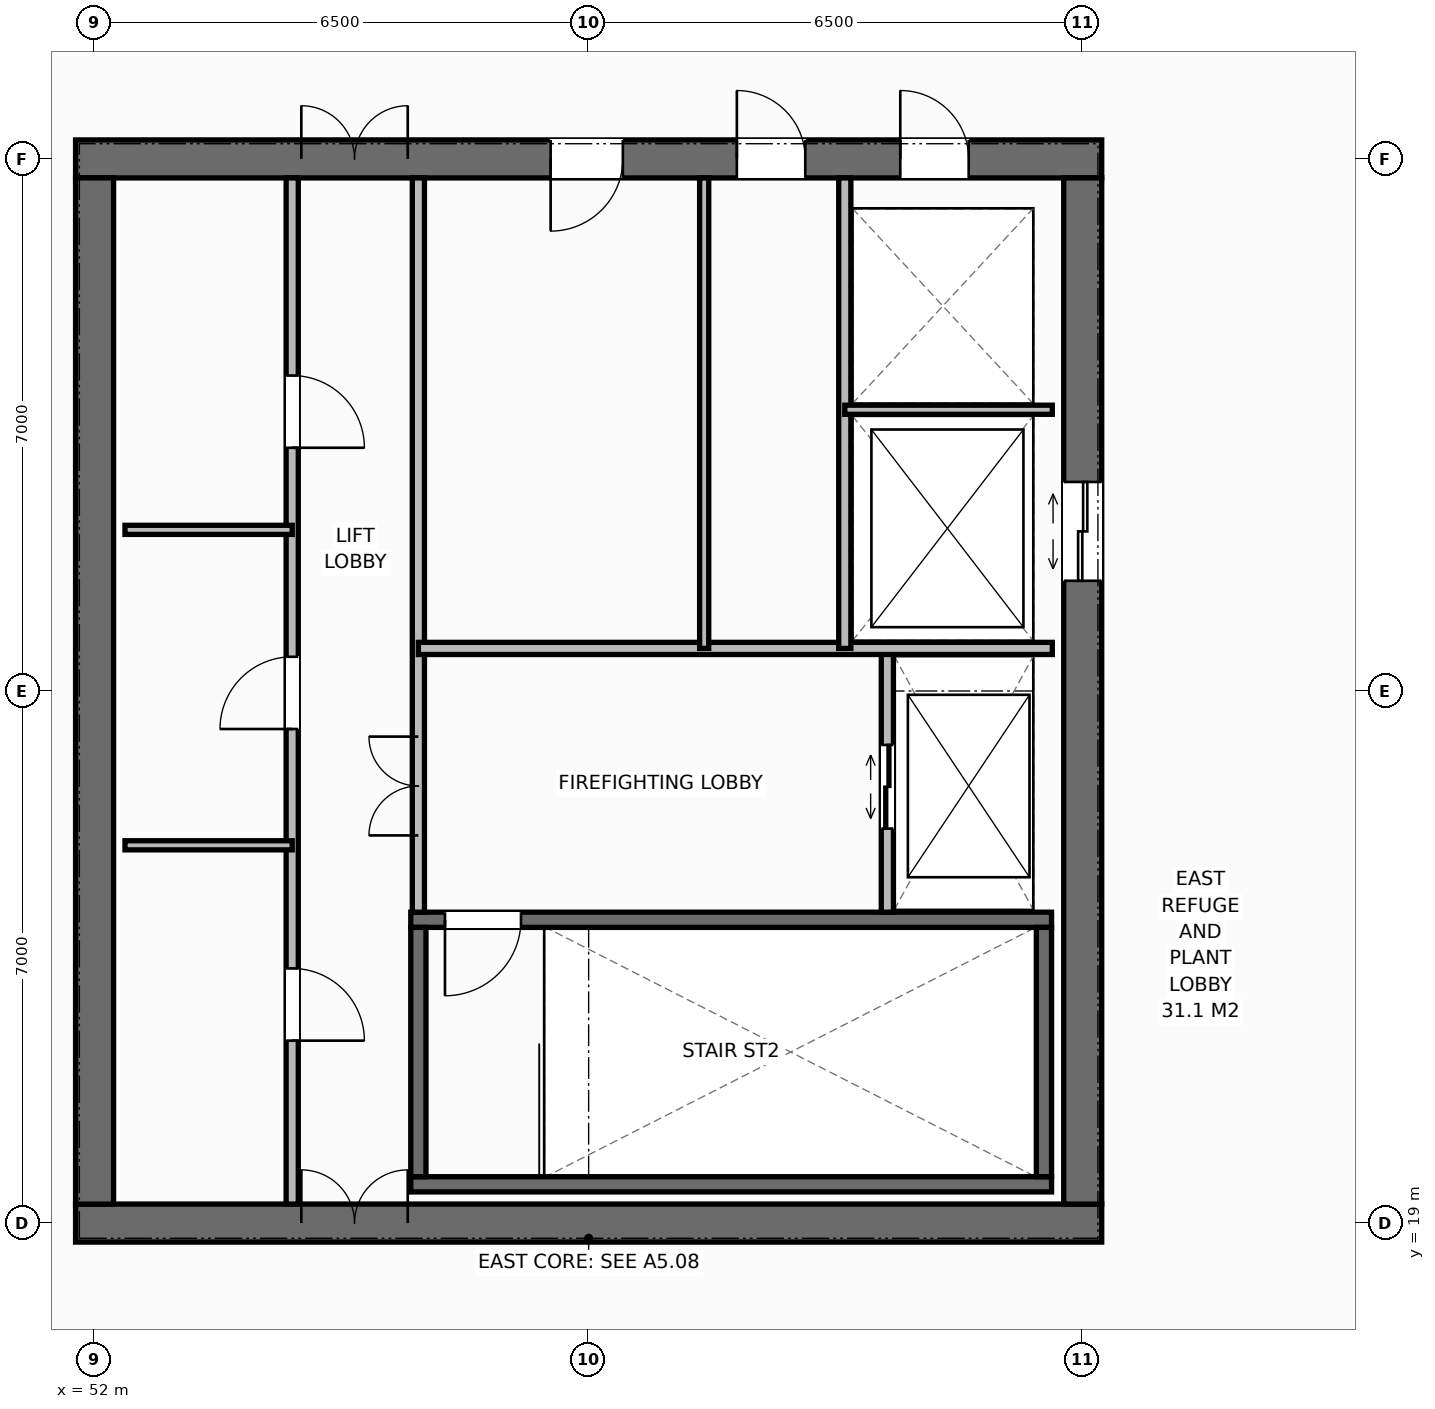
"""IFC4 building model, lengths in metres.
Left out: names, types, materials, properties, quantities, classifications, styles, units other than length and angle.
Written with IfcOpenShell. Run it as: python <this file> out.ifc"""

import sys

from ifc_helpers import new_model, si_unit, direction, frame, frame_2d, origin, place, context, subcontext, project, spatial, rectangle, extrude, element, fill, save


model = new_model("IFC4")
c1 = context("Model", 3, precision=1e-05, world=origin(), true_north=direction((0.0, 1.0)))
c2 = subcontext(c1, "Body", "Model", "MODEL_VIEW")
j1 = project(units=[si_unit("LENGTHUNIT", "METRE"), si_unit("PLANEANGLEUNIT", "RADIAN")], contexts=[c1])
p1 = place(None, origin())
s1 = spatial("IfcSite", under=j1, at=p1, CompositionType="ELEMENT")
p2 = place(p1, origin())
s2 = spatial("IfcBuilding", under=s1, at=p2, CompositionType="ELEMENT")
p3 = place(p2, frame((0.0, 0.0, 315.4)))
s3 = spatial("IfcBuildingStorey", under=s2, at=p3, CompositionType="ELEMENT", Elevation=315.4)
p4 = place(p3, frame((51.75, 19.0, 0.0), z_axis=(0.0, 0.0, 1.0), x_axis=(1.0, 0.0, 0.0)))
e1 = element("IfcWall", 1, at=p4, inside=s3, PredefinedType="SHEAR", context=c2, shape_type="SweptSolid", body=[
    extrude(rectangle(XDim=13.5, YDim=0.5, at=frame_2d((6.75, 0.0))), origin(), (0.0, 0.0, 1.0), 4.58),
])
p5 = place(p4, frame((2.97, 0.0, 0.0)))
e2 = element("IfcOpeningElement", 2, at=p5, cuts=e1, PredefinedType="OPENING", context=c2, shape_type="SweptSolid", body=[
    extrude(rectangle(XDim=1.4, YDim=2.2, at=frame_2d((0.7, 1.1))), frame((0.0, 0.26, 0.0), z_axis=(0.0, -1.0, 0.0), x_axis=(1.0, 0.0, 0.0)), (0.0, 0.0, 1.0), 0.52),
])
p6 = place(p3, frame((51.75, 33.0, 0.0), z_axis=(0.0, 0.0, 1.0), x_axis=(1.0, 0.0, 0.0)))
e3 = element("IfcWall", 3, at=p6, inside=s3, PredefinedType="SHEAR", context=c2, shape_type="SweptSolid", body=[
    extrude(rectangle(XDim=13.5, YDim=0.5, at=frame_2d((6.75, 0.0))), origin(), (0.0, 0.0, 1.0), 4.58),
])
p7 = place(p6, frame((2.97, 0.0, 0.0)))
e4 = element("IfcOpeningElement", 4, at=p7, cuts=e3, PredefinedType="OPENING", context=c2, shape_type="SweptSolid", body=[
    extrude(rectangle(XDim=1.4, YDim=2.2, at=frame_2d((0.7, 1.1))), frame((0.0, 0.26, 0.0), z_axis=(0.0, -1.0, 0.0), x_axis=(1.0, 0.0, 0.0)), (0.0, 0.0, 1.0), 0.52),
])
p8 = place(p6, frame((10.85, 0.0, 0.0)))
e5 = element("IfcOpeningElement", 5, at=p8, cuts=e3, PredefinedType="OPENING", context=c2, shape_type="SweptSolid", body=[
    extrude(rectangle(XDim=0.9, YDim=2.15, at=frame_2d((0.45, 1.075))), frame((0.0, 0.26, 0.0), z_axis=(0.0, -1.0, 0.0), x_axis=(1.0, 0.0, 0.0)), (0.0, 0.0, 1.0), 0.52),
])
p9 = place(p6, frame((6.25, 0.0, 0.0)))
e6 = element("IfcOpeningElement", 6, at=p9, cuts=e3, PredefinedType="OPENING", context=c2, shape_type="SweptSolid", body=[
    extrude(rectangle(XDim=0.95, YDim=2.15, at=frame_2d((0.475, 1.075))), frame((0.0, 0.26, 0.0), z_axis=(0.0, -1.0, 0.0), x_axis=(1.0, 0.0, 0.0)), (0.0, 0.0, 1.0), 0.52),
])
p10 = place(p6, frame((8.7, 0.0, 0.0)))
e7 = element("IfcOpeningElement", 7, at=p10, cuts=e3, PredefinedType="OPENING", context=c2, shape_type="SweptSolid", body=[
    extrude(rectangle(XDim=0.9, YDim=2.15, at=frame_2d((0.45, 1.075))), frame((0.0, 0.26, 0.0), z_axis=(0.0, -1.0, 0.0), x_axis=(1.0, 0.0, 0.0)), (0.0, 0.0, 1.0), 0.52),
])
p11 = place(p3, frame((52.0, 19.25, 0.0), z_axis=(0.0, 0.0, 1.0), x_axis=(0.0, 1.0, 0.0)))
e8 = element("IfcWall", 8, at=p11, inside=s3, PredefinedType="SHEAR", context=c2, shape_type="SweptSolid", body=[
    extrude(rectangle(XDim=13.5, YDim=0.5, at=frame_2d((6.75, 0.0))), origin(), (0.0, 0.0, 1.0), 4.58),
])
p12 = place(p3, frame((65.0, 19.25, 0.0), z_axis=(0.0, 0.0, 1.0), x_axis=(0.0, 1.0, 0.0)))
e9 = element("IfcWall", 9, at=p12, inside=s3, PredefinedType="SHEAR", context=c2, shape_type="SweptSolid", body=[
    extrude(rectangle(XDim=13.5, YDim=0.5, at=frame_2d((6.75, 0.0))), origin(), (0.0, 0.0, 1.0), 4.58),
])
p13 = place(p12, frame((8.2, 0.0, 0.0)))
e10 = element("IfcOpeningElement", 10, at=p13, cuts=e9, PredefinedType="OPENING", context=c2, shape_type="SweptSolid", body=[
    extrude(rectangle(XDim=1.3, YDim=2.2, at=frame_2d((0.65, 1.1))), frame((0.0, 0.26, 0.0), z_axis=(0.0, -1.0, 0.0), x_axis=(1.0, 0.0, 0.0)), (0.0, 0.0, 1.0), 0.52),
])
p14 = place(p3, frame((56.16, 19.51, 0.0), z_axis=(0.0, 0.0, 1.0), x_axis=(1.0, 0.0, 0.0)))
e11 = element("IfcWall", 11, at=p14, inside=s3, PredefinedType="SHEAR", context=c2, shape_type="SweptSolid", body=[
    extrude(rectangle(XDim=8.43, YDim=0.2, at=frame_2d((4.215, 0.0))), origin(), (0.0, 0.0, 1.0), 4.58),
])
p15 = place(p3, frame((56.16, 22.99, 0.0), z_axis=(0.0, 0.0, 1.0), x_axis=(1.0, 0.0, 0.0)))
e12 = element("IfcWall", 12, at=p15, inside=s3, PredefinedType="SHEAR", context=c2, shape_type="SweptSolid", body=[
    extrude(rectangle(XDim=8.43, YDim=0.2, at=frame_2d((4.215, 0.0))), origin(), (0.0, 0.0, 1.0), 4.58),
])
p16 = place(p15, frame((0.45, 0.0, 0.0)))
e13 = element("IfcOpeningElement", 13, at=p16, cuts=e12, PredefinedType="OPENING", context=c2, shape_type="SweptSolid", body=[
    extrude(rectangle(XDim=1.0, YDim=2.15, at=frame_2d((0.5, 1.075))), frame((0.0, 0.11, 0.0), z_axis=(0.0, -1.0, 0.0), x_axis=(1.0, 0.0, 0.0)), (0.0, 0.0, 1.0), 0.22),
])
for number, where, z_axis, x_axis in (
    (14, (56.26, 19.61, 0.0), (0.0, 0.0, 1.0), (0.0, 1.0, 0.0)),
    (15, (64.49, 19.61, 0.0), (0.0, 0.0, 1.0), (0.0, 1.0, 0.0)),
):
    element("IfcWall", number, at=place(p3, frame(where, z_axis=z_axis, x_axis=x_axis)), inside=s3, PredefinedType="SHEAR", context=c2, shape_type="SweptSolid", body=[
        extrude(rectangle(XDim=3.28, YDim=0.2, at=frame_2d((1.64, 0.0))), origin(), (0.0, 0.0, 1.0), 4.58),
    ])
p17 = place(p3, frame((54.6, 19.25, 0.0), z_axis=(0.0, 0.0, 1.0), x_axis=(0.0, 1.0, 0.0)))
e16 = element("IfcWall", 16, at=p17, inside=s3, PredefinedType="STANDARD", context=c2, shape_type="SweptSolid", body=[
    extrude(rectangle(XDim=13.5, YDim=0.16, at=frame_2d((6.75, 0.0))), origin(), (0.0, 0.0, 1.0), 4.58),
])
p18 = place(p17, frame((2.15, 0.0, 0.0)))
e17 = element("IfcOpeningElement", 17, at=p18, cuts=e16, PredefinedType="OPENING", context=c2, shape_type="SweptSolid", body=[
    extrude(rectangle(XDim=0.95, YDim=2.15, at=frame_2d((0.475, 1.075))), frame((0.0, 0.09, 0.0), z_axis=(0.0, -1.0, 0.0), x_axis=(1.0, 0.0, 0.0)), (0.0, 0.0, 1.0), 0.18),
])
p19 = place(p17, frame((6.25, 0.0, 0.0)))
e18 = element("IfcOpeningElement", 18, at=p19, cuts=e16, PredefinedType="OPENING", context=c2, shape_type="SweptSolid", body=[
    extrude(rectangle(XDim=0.95, YDim=2.15, at=frame_2d((0.475, 1.075))), frame((0.0, 0.09, 0.0), z_axis=(0.0, -1.0, 0.0), x_axis=(1.0, 0.0, 0.0)), (0.0, 0.0, 1.0), 0.18),
])
p20 = place(p17, frame((9.95, 0.0, 0.0)))
e19 = element("IfcOpeningElement", 19, at=p20, cuts=e16, PredefinedType="OPENING", context=c2, shape_type="SweptSolid", body=[
    extrude(rectangle(XDim=0.95, YDim=2.15, at=frame_2d((0.475, 1.075))), frame((0.0, 0.09, 0.0), z_axis=(0.0, -1.0, 0.0), x_axis=(1.0, 0.0, 0.0)), (0.0, 0.0, 1.0), 0.18),
])
p21 = place(p3, frame((56.26, 23.09, 0.0), z_axis=(0.0, 0.0, 1.0), x_axis=(0.0, 1.0, 0.0)))
e20 = element("IfcWall", 20, at=p21, inside=s3, PredefinedType="STANDARD", context=c2, shape_type="SweptSolid", body=[
    extrude(rectangle(XDim=9.66, YDim=0.16, at=frame_2d((4.83, 0.0))), origin(), (0.0, 0.0, 1.0), 4.58),
])
p22 = place(p21, frame((1.01, 0.0, 0.0)))
e21 = element("IfcOpeningElement", 21, at=p22, cuts=e20, PredefinedType="OPENING", context=c2, shape_type="SweptSolid", body=[
    extrude(rectangle(XDim=1.3, YDim=2.2, at=frame_2d((0.65, 1.1))), frame((0.0, 0.09, 0.0), z_axis=(0.0, -1.0, 0.0), x_axis=(1.0, 0.0, 0.0)), (0.0, 0.0, 1.0), 0.18),
])
for number, where, z_axis, x_axis in (
    (22, (52.4, 23.97, 0.0), (0.0, 0.0, 1.0), (1.0, 0.0, 0.0)),
    (23, (52.4, 28.12, 0.0), (0.0, 0.0, 1.0), (1.0, 0.0, 0.0)),
):
    element("IfcWall", number, at=place(p3, frame(where, z_axis=z_axis, x_axis=x_axis)), inside=s3, PredefinedType="PARTITIONING", context=c2, shape_type="SweptSolid", body=[
        extrude(rectangle(XDim=2.2, YDim=0.12, at=frame_2d((1.1, 0.0))), origin(), (0.0, 0.0, 1.0), 4.58),
    ])
p23 = place(p3, frame((62.43, 23.09, 0.0), z_axis=(0.0, 0.0, 1.0), x_axis=(0.0, 1.0, 0.0)))
e24 = element("IfcWall", 24, at=p23, inside=s3, PredefinedType="STANDARD", context=c2, shape_type="SweptSolid", body=[
    extrude(rectangle(XDim=3.47, YDim=0.16, at=frame_2d((1.735, 0.0))), origin(), (0.0, 0.0, 1.0), 4.58),
])
p24 = place(p23, frame((1.1, 0.0, 0.0)))
e25 = element("IfcOpeningElement", 25, at=p24, cuts=e24, PredefinedType="OPENING", context=c2, shape_type="SweptSolid", body=[
    extrude(rectangle(XDim=1.1, YDim=2.2, at=frame_2d((0.55, 1.1))), frame((0.0, 0.09, 0.0), z_axis=(0.0, -1.0, 0.0), x_axis=(1.0, 0.0, 0.0)), (0.0, 0.0, 1.0), 0.18),
])
p25 = place(p3, frame((56.26, 26.56, 0.0), z_axis=(0.0, 0.0, 1.0), x_axis=(1.0, 0.0, 0.0)))
e26 = element("IfcWall", 26, at=p25, inside=s3, PredefinedType="STANDARD", context=c2, shape_type="SweptSolid", body=[
    extrude(rectangle(XDim=8.34, YDim=0.16, at=frame_2d((4.17, 0.0))), origin(), (0.0, 0.0, 1.0), 4.58),
])
p26 = place(p3, frame((61.87, 26.56, 0.0), z_axis=(0.0, 0.0, 1.0), x_axis=(0.0, 1.0, 0.0)))
e27 = element("IfcWall", 27, at=p26, inside=s3, PredefinedType="STANDARD", context=c2, shape_type="SweptSolid", body=[
    extrude(rectangle(XDim=6.19, YDim=0.16, at=frame_2d((3.095, 0.0))), origin(), (0.0, 0.0, 1.0), 4.58),
])
p27 = place(p3, frame((61.87, 29.7, 0.0), z_axis=(0.0, 0.0, 1.0), x_axis=(1.0, 0.0, 0.0)))
e28 = element("IfcWall", 28, at=p27, inside=s3, PredefinedType="PARTITIONING", context=c2, shape_type="SweptSolid", body=[
    extrude(rectangle(XDim=2.73, YDim=0.12, at=frame_2d((1.365, 0.0))), origin(), (0.0, 0.0, 1.0), 4.58),
])
p28 = place(p3, frame((60.02, 26.56, 0.0), z_axis=(0.0, 0.0, 1.0), x_axis=(0.0, 1.0, 0.0)))
e29 = element("IfcWall", 29, at=p28, inside=s3, PredefinedType="PARTITIONING", context=c2, shape_type="SweptSolid", body=[
    extrude(rectangle(XDim=6.19, YDim=0.12, at=frame_2d((3.095, 0.0))), origin(), (0.0, 0.0, 1.0), 4.58),
])
p29 = place(p5, origin())
e30 = element("IfcDoor", 30, at=p29, inside=s3, OperationType="DOUBLE_DOOR_SINGLE_SWING", PredefinedType="DOOR", context=c2, shape_type="SweptSolid", body=[
    extrude(rectangle(XDim=1.4, YDim=2.2, at=frame_2d((0.7, 1.1))), frame((0.0, 0.075, 0.0), z_axis=(0.0, -1.0, 0.0), x_axis=(1.0, 0.0, 0.0)), (0.0, 0.0, 1.0), 0.05),
])
fill(e2, e30)
p30 = place(p7, origin())
e31 = element("IfcDoor", 31, at=p30, inside=s3, OperationType="DOUBLE_DOOR_SINGLE_SWING", PredefinedType="DOOR", context=c2, shape_type="SweptSolid", body=[
    extrude(rectangle(XDim=1.4, YDim=2.2, at=frame_2d((0.7, 1.1))), frame((0.0, -0.025, 0.0), z_axis=(0.0, -1.0, 0.0), x_axis=(1.0, 0.0, 0.0)), (0.0, 0.0, 1.0), 0.05),
])
fill(e4, e31)
p31 = place(p18, origin())
e32 = element("IfcDoor", 32, at=p31, inside=s3, OperationType="SINGLE_SWING_RIGHT", PredefinedType="DOOR", context=c2, shape_type="SweptSolid", body=[
    extrude(rectangle(XDim=0.95, YDim=2.15, at=frame_2d((0.475, 1.075))), frame((0.0, 0.025, 0.0), z_axis=(0.0, -1.0, 0.0), x_axis=(1.0, 0.0, 0.0)), (0.0, 0.0, 1.0), 0.05),
])
fill(e17, e32)
p32 = place(p19, origin())
e33 = element("IfcDoor", 33, at=p32, inside=s3, OperationType="SINGLE_SWING_LEFT", PredefinedType="DOOR", context=c2, shape_type="SweptSolid", body=[
    extrude(rectangle(XDim=0.95, YDim=2.15, at=frame_2d((0.475, 1.075))), frame((0.0, 0.025, 0.0), z_axis=(0.0, -1.0, 0.0), x_axis=(1.0, 0.0, 0.0)), (0.0, 0.0, 1.0), 0.05),
])
fill(e18, e33)
p33 = place(p20, origin())
e34 = element("IfcDoor", 34, at=p33, inside=s3, OperationType="SINGLE_SWING_RIGHT", PredefinedType="DOOR", context=c2, shape_type="SweptSolid", body=[
    extrude(rectangle(XDim=0.95, YDim=2.15, at=frame_2d((0.475, 1.075))), frame((0.0, 0.025, 0.0), z_axis=(0.0, -1.0, 0.0), x_axis=(1.0, 0.0, 0.0)), (0.0, 0.0, 1.0), 0.05),
])
fill(e19, e34)
p34 = place(p16, origin())
e35 = element("IfcDoor", 35, at=p34, inside=s3, OperationType="SINGLE_SWING_RIGHT", PredefinedType="DOOR", context=c2, shape_type="SweptSolid", body=[
    extrude(rectangle(XDim=1.0, YDim=2.15, at=frame_2d((0.5, 1.075))), frame((0.0, 0.025, 0.0), z_axis=(0.0, -1.0, 0.0), x_axis=(1.0, 0.0, 0.0)), (0.0, 0.0, 1.0), 0.05),
])
fill(e13, e35)
p35 = place(p24, origin())
e36 = element("IfcDoor", 36, at=p35, inside=s3, OperationType="DOUBLE_DOOR_SLIDING", PredefinedType="DOOR", context=c2, shape_type="SweptSolid", body=[
    extrude(rectangle(XDim=1.1, YDim=2.2, at=frame_2d((0.55, 1.1))), frame((0.0, 0.025, 0.0), z_axis=(0.0, -1.0, 0.0), x_axis=(1.0, 0.0, 0.0)), (0.0, 0.0, 1.0), 0.05),
])
fill(e25, e36)
p36 = place(p22, origin())
e37 = element("IfcDoor", 37, at=p36, inside=s3, OperationType="DOUBLE_DOOR_SINGLE_SWING", PredefinedType="DOOR", context=c2, shape_type="SweptSolid", body=[
    extrude(rectangle(XDim=1.3, YDim=2.2, at=frame_2d((0.65, 1.1))), frame((0.0, 0.025, 0.0), z_axis=(0.0, -1.0, 0.0), x_axis=(1.0, 0.0, 0.0)), (0.0, 0.0, 1.0), 0.05),
])
fill(e21, e37)
p37 = place(p13, origin())
e38 = element("IfcDoor", 38, at=p37, inside=s3, OperationType="DOUBLE_DOOR_SLIDING", PredefinedType="DOOR", context=c2, shape_type="SweptSolid", body=[
    extrude(rectangle(XDim=1.3, YDim=2.2, at=frame_2d((0.65, 1.1))), frame((0.0, 0.025, 0.0), z_axis=(0.0, -1.0, 0.0), x_axis=(1.0, 0.0, 0.0)), (0.0, 0.0, 1.0), 0.05),
])
fill(e10, e38)
p38 = place(p8, origin())
e39 = element("IfcDoor", 39, at=p38, inside=s3, OperationType="SINGLE_SWING_LEFT", PredefinedType="DOOR", context=c2, shape_type="SweptSolid", body=[
    extrude(rectangle(XDim=0.9, YDim=2.15, at=frame_2d((0.45, 1.075))), frame((0.0, -0.025, 0.0), z_axis=(0.0, -1.0, 0.0), x_axis=(1.0, 0.0, 0.0)), (0.0, 0.0, 1.0), 0.05),
])
fill(e5, e39)
p39 = place(p9, origin())
e40 = element("IfcDoor", 40, at=p39, inside=s3, OperationType="SINGLE_SWING_RIGHT", PredefinedType="DOOR", context=c2, shape_type="SweptSolid", body=[
    extrude(rectangle(XDim=0.95, YDim=2.15, at=frame_2d((0.475, 1.075))), frame((0.0, -0.025, 0.0), z_axis=(0.0, -1.0, 0.0), x_axis=(1.0, 0.0, 0.0)), (0.0, 0.0, 1.0), 0.05),
])
fill(e6, e40)
p40 = place(p10, origin())
e41 = element("IfcDoor", 41, at=p40, inside=s3, OperationType="SINGLE_SWING_LEFT", PredefinedType="DOOR", context=c2, shape_type="SweptSolid", body=[
    extrude(rectangle(XDim=0.9, YDim=2.15, at=frame_2d((0.45, 1.075))), frame((0.0, -0.025, 0.0), z_axis=(0.0, -1.0, 0.0), x_axis=(1.0, 0.0, 0.0)), (0.0, 0.0, 1.0), 0.05),
])
fill(e7, e41)
save(model, sys.argv[1])
